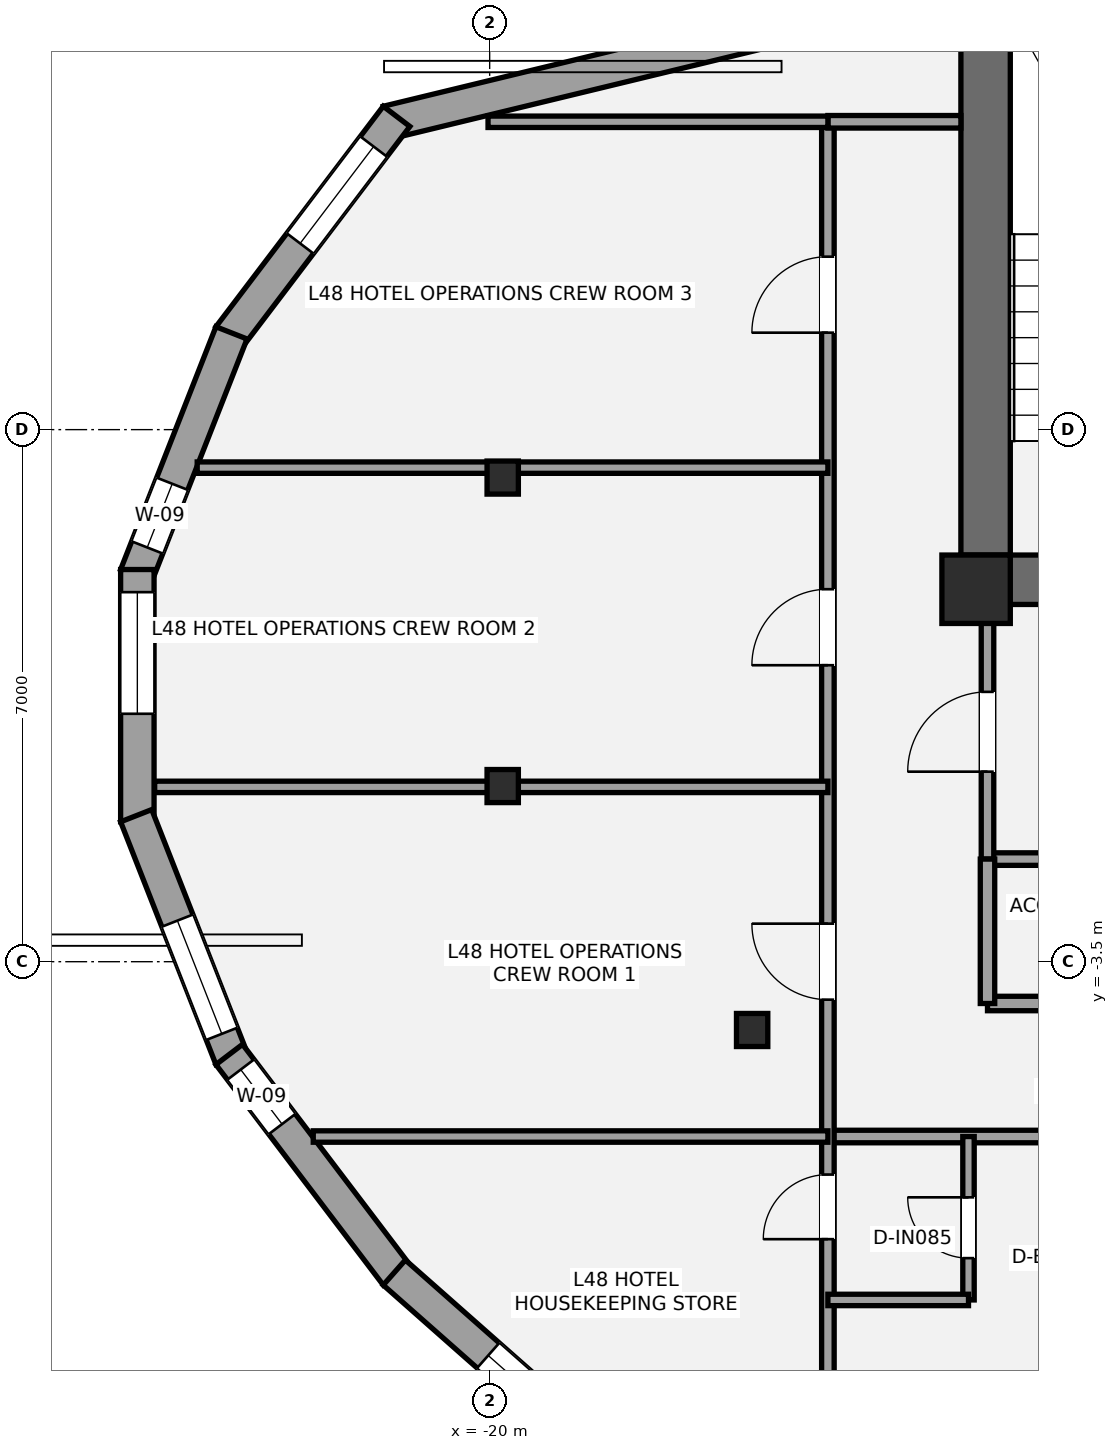
"""IFC4 building model, lengths in metres.
Left out: names, types, materials, properties, quantities, classifications, styles, units other than length and angle.
Written with IfcOpenShell. Run it as: python <this file> out.ifc"""

import sys

from ifc_helpers import new_model, si_unit, direction, frame, frame_2d, origin, origin_2d, place, context, subcontext, project, spatial, rectangle, i_section, extrude, element, fill, save


model = new_model("IFC4")
c1 = context("Model", 3, precision=1e-05, world=origin(), true_north=direction((0.0, 1.0)))
c2 = subcontext(c1, "Body", "Model", "MODEL_VIEW")
j1 = project(units=[si_unit("LENGTHUNIT", "METRE"), si_unit("PLANEANGLEUNIT", "RADIAN")], contexts=[c1])
p1 = place(None, origin())
s1 = spatial("IfcSite", under=j1, at=p1, CompositionType="ELEMENT")
p2 = place(p1, origin())
s2 = spatial("IfcBuilding", under=s1, at=p2, CompositionType="ELEMENT")
p3 = place(p2, frame((0.0, 0.0, 175.8)))
s3 = spatial("IfcBuildingStorey", under=s2, at=p3, CompositionType="ELEMENT", Elevation=175.8)
p4 = place(p3, frame((-13.475, 1.2, 0.0), z_axis=(0.0, 0.0, 1.0), x_axis=(0.0, 1.0, 0.0)))
e1 = element("IfcWall", 1, at=p4, inside=s3, PredefinedType="SHEAR", context=c2, shape_type="SweptSolid", body=[
    extrude(rectangle(XDim=8.45, YDim=0.65, at=frame_2d((4.225, 0.0))), origin(), (0.0, 0.0, 1.0), 3.2),
])
p5 = place(p3, frame((-4.875, 1.525, 0.0), z_axis=(0.0, 0.0, 1.0), x_axis=(-1.0, 0.0, 0.0)))
e2 = element("IfcWall", 2, at=p5, inside=s3, PredefinedType="SHEAR", context=c2, shape_type="SweptSolid", body=[
    extrude(rectangle(XDim=8.925, YDim=0.65, at=frame_2d((4.462, 0.0))), origin(), (0.0, 0.0, 1.0), 3.2),
])
p6 = place(p5, frame((5.425, 0.0, 0.0)))
e3 = element("IfcOpeningElement", 3, at=p6, cuts=e2, PredefinedType="OPENING", context=c2, shape_type="SweptSolid", body=[
    extrude(rectangle(XDim=1.05, YDim=2.15, at=frame_2d((0.525, 1.075))), frame((0.0, 0.335, 0.0), z_axis=(0.0, -1.0, 0.0), x_axis=(1.0, 0.0, 0.0)), (0.0, 0.0, 1.0), 0.67),
])
p7 = place(p5, frame((3.755, 0.0, 0.0)))
e4 = element("IfcOpeningElement", 4, at=p7, cuts=e2, PredefinedType="OPENING", context=c2, shape_type="SweptSolid", body=[
    extrude(rectangle(XDim=1.1, YDim=2.2, at=frame_2d((0.55, 1.1))), frame((0.0, 0.335, 0.0), z_axis=(0.0, -1.0, 0.0), x_axis=(1.0, 0.0, 0.0)), (0.0, 0.0, 1.0), 0.67),
])
p8 = place(p3, frame((-13.6, 1.4, 0.0), z_axis=(0.0, 0.0, 1.0), x_axis=(1.0, 0.0, 0.0)))
e5 = element("IfcColumn", 5, at=p8, inside=s3, PredefinedType="COLUMN", context=c2, shape_type="SweptSolid", body=[
    extrude(rectangle(XDim=0.9, YDim=0.9, at=origin_2d()), origin(), (0.0, 0.0, 1.0), 3.2),
])
for number, where, z_axis, x_axis in (
    (6, (-19.828, 2.869, 0.0), (0.0, 0.0, 1.0), (1.0, 0.0, 0.0)),
    (7, (-19.828, -1.189, 0.0), (0.0, 0.0, 1.0), (1.0, 0.0, 0.0)),
    (8, (-16.547, -4.398, 0.0), (0.0, 0.0, 1.0), (1.0, 0.0, 0.0)),
):
    element("IfcColumn", number, at=place(p3, frame(where, z_axis=z_axis, x_axis=x_axis)), inside=s3, PredefinedType="COLUMN", context=c2, shape_type="SweptSolid", body=[
        extrude(i_section(OverallWidth=0.412, OverallDepth=0.435, WebThickness=0.036, FlangeThickness=0.057, at=origin_2d()), origin(), (0.0, 0.0, 1.0), 3.2),
    ])
p9 = place(p3, frame((-21.348, 7.541, 0.0), z_axis=(0.0, 0.0, 1.0), x_axis=(0.971921788119, 0.235304138891, 0.0)))
e9 = element("IfcWall", 9, at=p9, inside=s3, PredefinedType="STANDARD", context=c2, shape_type="SweptSolid", body=[
    extrude(rectangle(XDim=5.55, YDim=0.44, at=frame_2d((2.775, 0.0))), origin(), (0.0, 0.0, 1.0), 2.315),
])
p10 = place(p3, frame((-23.427, 4.72, 0.0), z_axis=(0.0, 0.0, 1.0), x_axis=(0.604517065871, 0.796592189939, 0.0)))
e10 = element("IfcWall", 10, at=p10, inside=s3, PredefinedType="STANDARD", context=c2, shape_type="SweptSolid", body=[
    extrude(rectangle(XDim=3.642, YDim=0.44, at=frame_2d((1.821, 0.0))), origin(), (0.0, 0.0, 1.0), 2.315),
])
p11 = place(p10, frame((1.543, 0.0, 0.58)))
e11 = element("IfcOpeningElement", 11, at=p11, cuts=e10, PredefinedType="OPENING", context=c2, shape_type="SweptSolid", body=[
    extrude(rectangle(XDim=1.6, YDim=1.55, at=frame_2d((0.8, 0.775))), frame((0.0, 0.23, 0.0), z_axis=(0.0, -1.0, 0.0), x_axis=(1.0, 0.0, 0.0)), (0.0, 0.0, 1.0), 0.46),
])
p12 = place(p3, frame((-24.651, 1.579, 0.0), z_axis=(0.0, 0.0, 1.0), x_axis=(0.365421225195, 0.930842268151, 0.0)))
e12 = element("IfcWall", 12, at=p12, inside=s3, PredefinedType="STANDARD", context=c2, shape_type="SweptSolid", body=[
    extrude(rectangle(XDim=3.431, YDim=0.44, at=frame_2d((1.716, 0.0))), origin(), (0.0, 0.0, 1.0), 2.315),
])
p13 = place(p12, frame((0.398, 0.0, 0.58)))
e13 = element("IfcOpeningElement", 13, at=p13, cuts=e12, PredefinedType="OPENING", context=c2, shape_type="SweptSolid", body=[
    extrude(rectangle(XDim=0.9, YDim=1.35, at=frame_2d((0.45, 0.675))), frame((0.0, 0.23, 0.0), z_axis=(0.0, -1.0, 0.0), x_axis=(1.0, 0.0, 0.0)), (0.0, 0.0, 1.0), 0.46),
])
p14 = place(p3, frame((-24.635, -1.659, 0.0), z_axis=(0.0, 0.0, 1.0), x_axis=(0.0, 1.0, 0.0)))
e14 = element("IfcWall", 14, at=p14, inside=s3, PredefinedType="STANDARD", context=c2, shape_type="SweptSolid", body=[
    extrude(rectangle(XDim=3.319, YDim=0.44, at=frame_2d((1.659, 0.0))), origin(), (0.0, 0.0, 1.0), 2.315),
])
p15 = place(p14, frame((1.421, 0.0, 0.58)))
e15 = element("IfcOpeningElement", 15, at=p15, cuts=e14, PredefinedType="OPENING", context=c2, shape_type="SweptSolid", body=[
    extrude(rectangle(XDim=1.6, YDim=1.55, at=frame_2d((0.8, 0.775))), frame((0.0, 0.23, 0.0), z_axis=(0.0, -1.0, 0.0), x_axis=(1.0, 0.0, 0.0)), (0.0, 0.0, 1.0), 0.46),
])
p16 = place(p3, frame((-23.397, -4.773, 0.0), z_axis=(0.0, 0.0, 1.0), x_axis=(-0.365421225195, 0.930842268151, 0.0)))
e16 = element("IfcWall", 16, at=p16, inside=s3, PredefinedType="STANDARD", context=c2, shape_type="SweptSolid", body=[
    extrude(rectangle(XDim=3.431, YDim=0.44, at=frame_2d((1.716, 0.0))), origin(), (0.0, 0.0, 1.0), 2.315),
])
p17 = place(p16, frame((0.348, 0.0, 0.58)))
e17 = element("IfcOpeningElement", 17, at=p17, cuts=e16, PredefinedType="OPENING", context=c2, shape_type="SweptSolid", body=[
    extrude(rectangle(XDim=1.6, YDim=1.55, at=frame_2d((0.8, 0.775))), frame((0.0, 0.23, 0.0), z_axis=(0.0, -1.0, 0.0), x_axis=(1.0, 0.0, 0.0)), (0.0, 0.0, 1.0), 0.46),
])
p18 = place(p3, frame((-21.225, -7.621, 0.0), z_axis=(0.0, 0.0, 1.0), x_axis=(-0.604517065871, 0.796592189939, 0.0)))
e18 = element("IfcWall", 18, at=p18, inside=s3, PredefinedType="STANDARD", context=c2, shape_type="SweptSolid", body=[
    extrude(rectangle(XDim=3.642, YDim=0.44, at=frame_2d((1.821, 0.0))), origin(), (0.0, 0.0, 1.0), 2.315),
])
p19 = place(p18, frame((2.492, 0.0, 0.58)))
e19 = element("IfcOpeningElement", 19, at=p19, cuts=e18, PredefinedType="OPENING", context=c2, shape_type="SweptSolid", body=[
    extrude(rectangle(XDim=0.9, YDim=1.35, at=frame_2d((0.45, 0.675))), frame((0.0, 0.23, 0.0), z_axis=(0.0, -1.0, 0.0), x_axis=(1.0, 0.0, 0.0)), (0.0, 0.0, 1.0), 0.46),
])
p20 = place(p3, frame((-18.371, -10.136, 0.0), z_axis=(0.0, 0.0, 1.0), x_axis=(-0.749530401757, 0.661969921403, 0.0)))
e20 = element("IfcWall", 20, at=p20, inside=s3, PredefinedType="STANDARD", context=c2, shape_type="SweptSolid", body=[
    extrude(rectangle(XDim=3.848, YDim=0.44, at=frame_2d((1.924, 0.0))), origin(), (0.0, 0.0, 1.0), 2.315),
])
p21 = place(p20, frame((0.6, 0.0, 0.58)))
e21 = element("IfcOpeningElement", 21, at=p21, cuts=e20, PredefinedType="OPENING", context=c2, shape_type="SweptSolid", body=[
    extrude(rectangle(XDim=1.6, YDim=1.55, at=frame_2d((0.8, 0.775))), frame((0.0, 0.23, 0.0), z_axis=(0.0, -1.0, 0.0), x_axis=(1.0, 0.0, 0.0)), (0.0, 0.0, 1.0), 0.46),
])
p22 = place(p3, frame((-13.45, -2.15, 0.0), z_axis=(0.0, 0.0, 1.0), x_axis=(1.0, 0.0, 0.0)))
e22 = element("IfcWall", 22, at=p22, inside=s3, PredefinedType="PARTITIONING", context=c2, shape_type="SweptSolid", body=[
    extrude(rectangle(XDim=6.25, YDim=0.165, at=frame_2d((3.125, 0.0))), origin(), (0.0, 0.0, 1.0), 2.473),
])
p23 = place(p3, frame((-13.45, -2.15, 0.0), z_axis=(0.0, 0.0, 1.0), x_axis=(0.0, 1.0, 0.0)))
e23 = element("IfcWall", 23, at=p23, inside=s3, PredefinedType="PARTITIONING", context=c2, shape_type="SweptSolid", body=[
    extrude(rectangle(XDim=3.4, YDim=0.165, at=frame_2d((1.7, 0.0))), origin(), (0.0, 0.0, 1.0), 2.473),
])
p24 = place(p23, frame((1.15, 0.0, 0.0)))
e24 = element("IfcOpeningElement", 24, at=p24, cuts=e23, PredefinedType="OPENING", context=c2, shape_type="SweptSolid", body=[
    extrude(rectangle(XDim=1.05, YDim=2.15, at=frame_2d((0.525, 1.075))), frame((0.0, 0.093, 0.0), z_axis=(0.0, -1.0, 0.0), x_axis=(1.0, 0.0, 0.0)), (0.0, 0.0, 1.0), 0.185),
])
p25 = place(p3, frame((-13.45, -4.05, 0.0), z_axis=(0.0, 0.0, 1.0), x_axis=(1.0, 0.0, 0.0)))
e25 = element("IfcWall", 25, at=p25, inside=s3, PredefinedType="PLUMBINGWALL", context=c2, shape_type="SweptSolid", body=[
    extrude(rectangle(XDim=11.35, YDim=0.19, at=frame_2d((5.675, 0.0))), origin(), (0.0, 0.0, 1.0), 2.473),
])
p26 = place(p25, frame((1.25, 0.0, 0.0)))
e26 = element("IfcOpeningElement", 26, at=p26, cuts=e25, PredefinedType="OPENING", context=c2, shape_type="SweptSolid", body=[
    extrude(rectangle(XDim=0.95, YDim=2.15, at=frame_2d((0.475, 1.075))), frame((0.0, 0.105, 0.0), z_axis=(0.0, -1.0, 0.0), x_axis=(1.0, 0.0, 0.0)), (0.0, 0.0, 1.0), 0.21),
])
p27 = place(p25, frame((6.4, 0.0, 0.0)))
e27 = element("IfcOpeningElement", 27, at=p27, cuts=e25, PredefinedType="OPENING", context=c2, shape_type="SweptSolid", body=[
    extrude(rectangle(XDim=0.9, YDim=2.1, at=frame_2d((0.45, 1.05))), frame((0.0, 0.105, 0.0), z_axis=(0.0, -1.0, 0.0), x_axis=(1.0, 0.0, 0.0)), (0.0, 0.0, 1.0), 0.21),
])
p28 = place(p3, frame((-13.45, -4.05, 0.0), z_axis=(0.0, 0.0, 1.0), x_axis=(0.0, 1.0, 0.0)))
e28 = element("IfcWall", 28, at=p28, inside=s3, PredefinedType="PLUMBINGWALL", context=c2, shape_type="SweptSolid", body=[
    extrude(rectangle(XDim=1.9, YDim=0.19, at=frame_2d((0.95, 0.0))), origin(), (0.0, 0.0, 1.0), 2.473),
])
p29 = place(p3, frame((-15.55, -5.8, 0.0), z_axis=(0.0, 0.0, 1.0), x_axis=(1.0, 0.0, 0.0)))
e29 = element("IfcWall", 29, at=p29, inside=s3, PredefinedType="PARTITIONING", context=c2, shape_type="SweptSolid", body=[
    extrude(rectangle(XDim=31.1, YDim=0.165, at=frame_2d((15.55, 0.0))), origin(), (0.0, 0.0, 1.0), 2.398),
])
p30 = place(p29, frame((5.4, 0.0, 0.0)))
e30 = element("IfcOpeningElement", 30, at=p30, cuts=e29, PredefinedType="OPENING", context=c2, shape_type="SweptSolid", body=[
    extrude(rectangle(XDim=0.95, YDim=2.15, at=frame_2d((0.475, 1.075))), frame((0.0, 0.093, 0.0), z_axis=(0.0, -1.0, 0.0), x_axis=(1.0, 0.0, 0.0)), (0.0, 0.0, 1.0), 0.185),
])
p31 = place(p29, frame((13.2, 0.0, 0.0)))
e31 = element("IfcOpeningElement", 31, at=p31, cuts=e29, PredefinedType="OPENING", context=c2, shape_type="SweptSolid", body=[
    extrude(rectangle(XDim=0.95, YDim=2.15, at=frame_2d((0.475, 1.075))), frame((0.0, 0.093, 0.0), z_axis=(0.0, -1.0, 0.0), x_axis=(1.0, 0.0, 0.0)), (0.0, 0.0, 1.0), 0.185),
])
p32 = place(p29, frame((21.0, 0.0, 0.0)))
e32 = element("IfcOpeningElement", 32, at=p32, cuts=e29, PredefinedType="OPENING", context=c2, shape_type="SweptSolid", body=[
    extrude(rectangle(XDim=0.95, YDim=2.15, at=frame_2d((0.475, 1.075))), frame((0.0, 0.093, 0.0), z_axis=(0.0, -1.0, 0.0), x_axis=(1.0, 0.0, 0.0)), (0.0, 0.0, 1.0), 0.185),
])
p33 = place(p29, frame((29.75, 0.0, 0.0)))
e33 = element("IfcOpeningElement", 33, at=p33, cuts=e29, PredefinedType="OPENING", context=c2, shape_type="SweptSolid", body=[
    extrude(rectangle(XDim=0.95, YDim=2.15, at=frame_2d((0.475, 1.075))), frame((0.0, 0.093, 0.0), z_axis=(0.0, -1.0, 0.0), x_axis=(1.0, 0.0, 0.0)), (0.0, 0.0, 1.0), 0.185),
])
p34 = place(p3, frame((-15.55, -11.771, 0.0), z_axis=(0.0, 0.0, 1.0), x_axis=(0.0, 1.0, 0.0)))
e34 = element("IfcWall", 34, at=p34, inside=s3, PredefinedType="PARTITIONING", context=c2, shape_type="SweptSolid", body=[
    extrude(rectangle(XDim=19.321, YDim=0.165, at=frame_2d((9.661, 0.0))), origin(), (0.0, 0.0, 1.0), 2.473),
])
p35 = place(p34, frame((4.621, 0.0, 0.0)))
e35 = element("IfcOpeningElement", 35, at=p35, cuts=e34, PredefinedType="OPENING", context=c2, shape_type="SweptSolid", body=[
    extrude(rectangle(XDim=0.85, YDim=2.1, at=frame_2d((0.425, 1.05))), frame((0.0, 0.093, 0.0), z_axis=(0.0, -1.0, 0.0), x_axis=(1.0, 0.0, 0.0)), (0.0, 0.0, 1.0), 0.185),
])
p36 = place(p34, frame((7.771, 0.0, 0.0)))
e36 = element("IfcOpeningElement", 36, at=p36, cuts=e34, PredefinedType="OPENING", context=c2, shape_type="SweptSolid", body=[
    extrude(rectangle(XDim=1.0, YDim=2.15, at=frame_2d((0.5, 1.075))), frame((0.0, 0.093, 0.0), z_axis=(0.0, -1.0, 0.0), x_axis=(1.0, 0.0, 0.0)), (0.0, 0.0, 1.0), 0.185),
])
p37 = place(p34, frame((12.172, 0.0, 0.0)))
e37 = element("IfcOpeningElement", 37, at=p37, cuts=e34, PredefinedType="OPENING", context=c2, shape_type="SweptSolid", body=[
    extrude(rectangle(XDim=1.0, YDim=2.15, at=frame_2d((0.5, 1.075))), frame((0.0, 0.093, 0.0), z_axis=(0.0, -1.0, 0.0), x_axis=(1.0, 0.0, 0.0)), (0.0, 0.0, 1.0), 0.185),
])
p38 = place(p34, frame((16.547, 0.0, 0.0)))
e38 = element("IfcOpeningElement", 38, at=p38, cuts=e34, PredefinedType="OPENING", context=c2, shape_type="SweptSolid", body=[
    extrude(rectangle(XDim=1.0, YDim=2.15, at=frame_2d((0.5, 1.075))), frame((0.0, 0.093, 0.0), z_axis=(0.0, -1.0, 0.0), x_axis=(1.0, 0.0, 0.0)), (0.0, 0.0, 1.0), 0.185),
])
p39 = place(p3, frame((-15.55, 7.55, 0.0), z_axis=(0.0, 0.0, 1.0), x_axis=(1.0, 0.0, 0.0)))
e39 = element("IfcWall", 39, at=p39, inside=s3, PredefinedType="PARTITIONING", context=c2, shape_type="SweptSolid", body=[
    extrude(rectangle(XDim=1.75, YDim=0.165, at=frame_2d((0.875, 0.0))), origin(), (0.0, 0.0, 1.0), 3.02),
])
p40 = place(p3, frame((-20.021, 7.55, 0.0), z_axis=(0.0, 0.0, 1.0), x_axis=(1.0, 0.0, 0.0)))
e40 = element("IfcWall", 40, at=p40, inside=s3, PredefinedType="PLUMBINGWALL", context=c2, shape_type="SweptSolid", body=[
    extrude(rectangle(XDim=4.471, YDim=0.15, at=frame_2d((2.236, 0.0))), origin(), (0.0, 0.0, 1.0), 3.02),
])
p41 = place(p3, frame((-22.321, -5.8, 0.0), z_axis=(0.0, 0.0, 1.0), x_axis=(1.0, 0.0, 0.0)))
e41 = element("IfcWall", 41, at=p41, inside=s3, PredefinedType="PLUMBINGWALL", context=c2, shape_type="SweptSolid", body=[
    extrude(rectangle(XDim=6.771, YDim=0.15, at=frame_2d((3.385, 0.0))), origin(), (0.0, 0.0, 1.0), 2.473),
])
p42 = place(p3, frame((-13.7, -7.95, 0.0), z_axis=(0.0, 0.0, 1.0), x_axis=(0.0, 1.0, 0.0)))
e42 = element("IfcWall", 42, at=p42, inside=s3, PredefinedType="PLUMBINGWALL", context=c2, shape_type="SweptSolid", body=[
    extrude(rectangle(XDim=2.15, YDim=0.15, at=frame_2d((1.075, 0.0))), origin(), (0.0, 0.0, 1.0), 2.473),
])
p43 = place(p42, frame((0.55, 0.0, 0.0)))
e43 = element("IfcOpeningElement", 43, at=p43, cuts=e42, PredefinedType="OPENING", context=c2, shape_type="SweptSolid", body=[
    extrude(rectangle(XDim=0.8, YDim=2.1, at=frame_2d((0.4, 1.05))), frame((0.0, 0.085, 0.0), z_axis=(0.0, -1.0, 0.0), x_axis=(1.0, 0.0, 0.0)), (0.0, 0.0, 1.0), 0.17),
])
p44 = place(p3, frame((-15.55, -7.95, 0.0), z_axis=(0.0, 0.0, 1.0), x_axis=(1.0, 0.0, 0.0)))
e44 = element("IfcWall", 44, at=p44, inside=s3, PredefinedType="PLUMBINGWALL", context=c2, shape_type="SweptSolid", body=[
    extrude(rectangle(XDim=1.85, YDim=0.15, at=frame_2d((0.925, 0.0))), origin(), (0.0, 0.0, 1.0), 2.473),
])
p45 = place(p3, frame((-24.408, -1.2, 0.0), z_axis=(0.0, 0.0, 1.0), x_axis=(1.0, 0.0, 0.0)))
e45 = element("IfcWall", 45, at=p45, inside=s3, PredefinedType="PLUMBINGWALL", context=c2, shape_type="SweptSolid", body=[
    extrude(rectangle(XDim=8.858, YDim=0.15, at=frame_2d((4.429, 0.0))), origin(), (0.0, 0.0, 1.0), 2.398),
])
p46 = place(p3, frame((-23.848, 3.0, 0.0), z_axis=(0.0, 0.0, 1.0), x_axis=(1.0, 0.0, 0.0)))
e46 = element("IfcWall", 46, at=p46, inside=s3, PredefinedType="PLUMBINGWALL", context=c2, shape_type="SweptSolid", body=[
    extrude(rectangle(XDim=8.298, YDim=0.15, at=frame_2d((4.149, 0.0))), origin(), (0.0, 0.0, 1.0), 2.473),
])
p47 = place(p11, origin())
e47 = element("IfcWindow", 47, at=p47, inside=s3, PartitioningType="SINGLE_PANEL", PredefinedType="WINDOW", context=c2, shape_type="SweptSolid", body=[
    extrude(rectangle(XDim=1.6, YDim=1.55, at=frame_2d((0.8, 0.775))), frame((0.0, -0.01, 0.0), z_axis=(0.0, -1.0, 0.0), x_axis=(1.0, 0.0, 0.0)), (0.0, 0.0, 1.0), 0.06),
])
fill(e11, e47)
p48 = place(p13, origin())
e48 = element("IfcWindow", 48, at=p48, inside=s3, PartitioningType="SINGLE_PANEL", PredefinedType="WINDOW", context=c2, shape_type="SweptSolid", body=[
    extrude(rectangle(XDim=0.9, YDim=1.35, at=frame_2d((0.45, 0.675))), frame((0.0, -0.01, 0.0), z_axis=(0.0, -1.0, 0.0), x_axis=(1.0, 0.0, 0.0)), (0.0, 0.0, 1.0), 0.06),
])
fill(e13, e48)
p49 = place(p15, origin())
e49 = element("IfcWindow", 49, at=p49, inside=s3, PartitioningType="SINGLE_PANEL", PredefinedType="WINDOW", context=c2, shape_type="SweptSolid", body=[
    extrude(rectangle(XDim=1.6, YDim=1.55, at=frame_2d((0.8, 0.775))), frame((0.0, -0.01, 0.0), z_axis=(0.0, -1.0, 0.0), x_axis=(1.0, 0.0, 0.0)), (0.0, 0.0, 1.0), 0.06),
])
fill(e15, e49)
p50 = place(p17, origin())
e50 = element("IfcWindow", 50, at=p50, inside=s3, PartitioningType="SINGLE_PANEL", PredefinedType="WINDOW", context=c2, shape_type="SweptSolid", body=[
    extrude(rectangle(XDim=1.6, YDim=1.55, at=frame_2d((0.8, 0.775))), frame((0.0, -0.01, 0.0), z_axis=(0.0, -1.0, 0.0), x_axis=(1.0, 0.0, 0.0)), (0.0, 0.0, 1.0), 0.06),
])
fill(e17, e50)
p51 = place(p19, origin())
e51 = element("IfcWindow", 51, at=p51, inside=s3, PartitioningType="SINGLE_PANEL", PredefinedType="WINDOW", context=c2, shape_type="SweptSolid", body=[
    extrude(rectangle(XDim=0.9, YDim=1.35, at=frame_2d((0.45, 0.675))), frame((0.0, -0.01, 0.0), z_axis=(0.0, -1.0, 0.0), x_axis=(1.0, 0.0, 0.0)), (0.0, 0.0, 1.0), 0.06),
])
fill(e19, e51)
p52 = place(p21, origin())
e52 = element("IfcWindow", 52, at=p52, inside=s3, PartitioningType="SINGLE_PANEL", PredefinedType="WINDOW", context=c2, shape_type="SweptSolid", body=[
    extrude(rectangle(XDim=1.6, YDim=1.55, at=frame_2d((0.8, 0.775))), frame((0.0, -0.01, 0.0), z_axis=(0.0, -1.0, 0.0), x_axis=(1.0, 0.0, 0.0)), (0.0, 0.0, 1.0), 0.06),
])
fill(e21, e52)
p53 = place(p24, origin())
e53 = element("IfcDoor", 53, at=p53, inside=s3, OperationType="SINGLE_SWING_LEFT", PredefinedType="DOOR", context=c2, shape_type="SweptSolid", body=[
    extrude(rectangle(XDim=1.05, YDim=2.15, at=frame_2d((0.525, 1.075))), frame((0.0, 0.025, 0.0), z_axis=(0.0, -1.0, 0.0), x_axis=(1.0, 0.0, 0.0)), (0.0, 0.0, 1.0), 0.05),
])
fill(e24, e53)
p54 = place(p35, origin())
e54 = element("IfcDoor", 54, at=p54, inside=s3, OperationType="SINGLE_SWING_LEFT", PredefinedType="DOOR", context=c2, shape_type="SweptSolid", body=[
    extrude(rectangle(XDim=0.85, YDim=2.1, at=frame_2d((0.425, 1.05))), frame((0.0, 0.025, 0.0), z_axis=(0.0, -1.0, 0.0), x_axis=(1.0, 0.0, 0.0)), (0.0, 0.0, 1.0), 0.05),
])
fill(e35, e54)
p55 = place(p43, origin())
e55 = element("IfcDoor", 55, at=p55, inside=s3, OperationType="SINGLE_SWING_RIGHT", PredefinedType="DOOR", context=c2, shape_type="SweptSolid", body=[
    extrude(rectangle(XDim=0.8, YDim=2.1, at=frame_2d((0.4, 1.05))), frame((0.0, 0.025, 0.0), z_axis=(0.0, -1.0, 0.0), x_axis=(1.0, 0.0, 0.0)), (0.0, 0.0, 1.0), 0.05),
])
fill(e43, e55)
p56 = place(p36, origin())
e56 = element("IfcDoor", 56, at=p56, inside=s3, OperationType="SINGLE_SWING_RIGHT", PredefinedType="DOOR", context=c2, shape_type="SweptSolid", body=[
    extrude(rectangle(XDim=1.0, YDim=2.15, at=frame_2d((0.5, 1.075))), frame((0.0, 0.025, 0.0), z_axis=(0.0, -1.0, 0.0), x_axis=(1.0, 0.0, 0.0)), (0.0, 0.0, 1.0), 0.05),
])
fill(e36, e56)
p57 = place(p37, origin())
e57 = element("IfcDoor", 57, at=p57, inside=s3, OperationType="SINGLE_SWING_LEFT", PredefinedType="DOOR", context=c2, shape_type="SweptSolid", body=[
    extrude(rectangle(XDim=1.0, YDim=2.15, at=frame_2d((0.5, 1.075))), frame((0.0, 0.025, 0.0), z_axis=(0.0, -1.0, 0.0), x_axis=(1.0, 0.0, 0.0)), (0.0, 0.0, 1.0), 0.05),
])
fill(e37, e57)
p58 = place(p38, origin())
e58 = element("IfcDoor", 58, at=p58, inside=s3, OperationType="SINGLE_SWING_LEFT", PredefinedType="DOOR", context=c2, shape_type="SweptSolid", body=[
    extrude(rectangle(XDim=1.0, YDim=2.15, at=frame_2d((0.5, 1.075))), frame((0.0, 0.025, 0.0), z_axis=(0.0, -1.0, 0.0), x_axis=(1.0, 0.0, 0.0)), (0.0, 0.0, 1.0), 0.05),
])
fill(e38, e58)
save(model, sys.argv[1])
